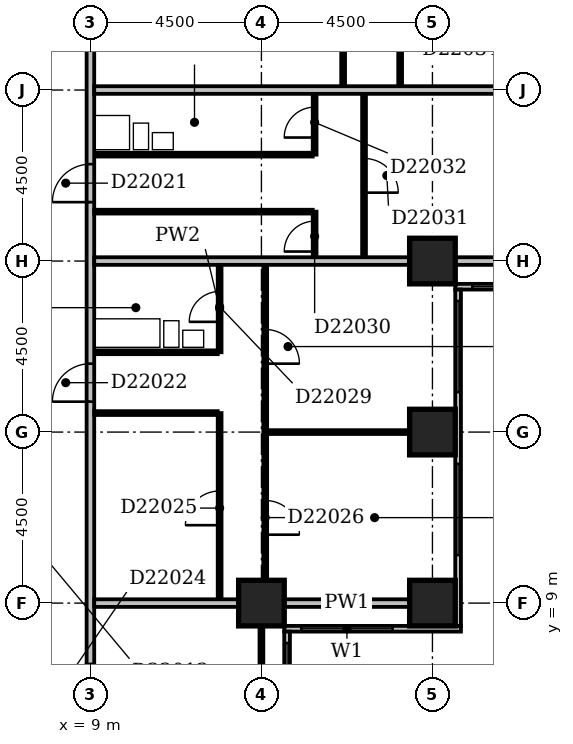
"""IFC4 building model, lengths in metres.
Left out: names, types, materials, properties, quantities, classifications, styles, units other than length and angle.
Written with IfcOpenShell. Run it as: python <this file> out.ifc"""

import sys

from ifc_helpers import new_model, si_unit, direction, frame, frame_2d, origin, origin_2d, place, context, subcontext, project, spatial, rectangle, extrude, element, fill, save


model = new_model("IFC4")
c1 = context("Model", 3, precision=1e-05, world=origin(), true_north=direction((0.0, 1.0)))
c2 = subcontext(c1, "Body", "Model", "MODEL_VIEW")
j1 = project(units=[si_unit("LENGTHUNIT", "METRE"), si_unit("PLANEANGLEUNIT", "RADIAN")], contexts=[c1])
p1 = place(None, origin())
s1 = spatial("IfcSite", under=j1, at=p1, CompositionType="ELEMENT")
p2 = place(p1, origin())
s2 = spatial("IfcBuilding", under=s1, at=p2, CompositionType="ELEMENT")
p3 = place(p2, frame((0.0, 0.0, 90.2)))
s3 = spatial("IfcBuildingStorey", under=s2, at=p3, CompositionType="ELEMENT", Elevation=90.2)
for number, where, z_axis, x_axis in (
    (1, (13.5, 9.0, -0.3), (0.0, 0.0, 1.0), (1.0, 0.0, 0.0)),
    (2, (18.0, 9.0, -0.3), (0.0, 0.0, 1.0), (1.0, 0.0, 0.0)),
    (3, (18.0, 13.5, -0.3), (0.0, 0.0, 1.0), (1.0, 0.0, 0.0)),
    (4, (18.0, 18.0, -0.3), (0.0, 0.0, 1.0), (1.0, 0.0, 0.0)),
):
    element("IfcColumn", number, at=place(p3, frame(where, z_axis=z_axis, x_axis=x_axis)), inside=s3, PredefinedType="COLUMN", context=c2, shape_type="SweptSolid", body=[
        extrude(rectangle(XDim=1.2, YDim=1.2, at=origin_2d()), origin(), (0.0, 0.0, 1.0), 3.6),
    ])
p4 = place(p3, frame((14.175, 3.9, 0.0), z_axis=(0.0, 0.0, 1.0), x_axis=(0.0, 1.0, 0.0)))
e5 = element("IfcWall", 5, at=p4, inside=s3, PredefinedType="STANDARD", context=c2, shape_type="SweptSolid", body=[
    extrude(rectangle(XDim=4.35, YDim=0.15, at=frame_2d((2.175, 0.0))), origin(), (0.0, 0.0, 1.0), 2.7),
])
p5 = place(p4, frame((1.65, 0.0, 0.6)))
e6 = element("IfcOpeningElement", 6, at=p5, cuts=e5, PredefinedType="OPENING", context=c2, shape_type="SweptSolid", body=[
    extrude(rectangle(XDim=2.4, YDim=1.8, at=frame_2d((1.2, 0.9))), frame((0.0, 0.087, 0.0), z_axis=(0.0, -1.0, 0.0), x_axis=(1.0, 0.0, 0.0)), (0.0, 0.0, 1.0), 0.174),
])
p6 = place(p3, frame((14.1, 8.325, 0.0), z_axis=(0.0, 0.0, 1.0), x_axis=(1.0, 0.0, 0.0)))
e7 = element("IfcWall", 7, at=p6, inside=s3, PredefinedType="STANDARD", context=c2, shape_type="SweptSolid", body=[
    extrude(rectangle(XDim=4.65, YDim=0.15, at=frame_2d((2.325, 0.0))), origin(), (0.0, 0.0, 1.0), 2.7),
])
p7 = place(p6, frame((0.45, 0.0, 0.6)))
e8 = element("IfcOpeningElement", 8, at=p7, cuts=e7, PredefinedType="OPENING", context=c2, shape_type="SweptSolid", body=[
    extrude(rectangle(XDim=2.4, YDim=1.8, at=frame_2d((1.2, 0.9))), frame((0.0, 0.087, 0.0), z_axis=(0.0, -1.0, 0.0), x_axis=(1.0, 0.0, 0.0)), (0.0, 0.0, 1.0), 0.174),
])
p8 = place(p3, frame((18.675, 8.4, 0.0), z_axis=(0.0, 0.0, 1.0), x_axis=(0.0, 1.0, 0.0)))
e9 = element("IfcWall", 9, at=p8, inside=s3, PredefinedType="STANDARD", context=c2, shape_type="SweptSolid", body=[
    extrude(rectangle(XDim=8.85, YDim=0.15, at=frame_2d((4.425, 0.0))), origin(), (0.0, 0.0, 1.0), 2.7),
])
p9 = place(p8, frame((1.864, 0.0, 0.6)))
e10 = element("IfcOpeningElement", 10, at=p9, cuts=e9, PredefinedType="OPENING", context=c2, shape_type="SweptSolid", body=[
    extrude(rectangle(XDim=2.4, YDim=1.8, at=frame_2d((1.2, 0.9))), frame((0.0, 0.087, 0.0), z_axis=(0.0, -1.0, 0.0), x_axis=(1.0, 0.0, 0.0)), (0.0, 0.0, 1.0), 0.174),
])
p10 = place(p8, frame((6.15, 0.0, 0.6)))
e11 = element("IfcOpeningElement", 11, at=p10, cuts=e9, PredefinedType="OPENING", context=c2, shape_type="SweptSolid", body=[
    extrude(rectangle(XDim=2.4, YDim=1.8, at=frame_2d((1.2, 0.9))), frame((0.0, 0.087, 0.0), z_axis=(0.0, -1.0, 0.0), x_axis=(1.0, 0.0, 0.0)), (0.0, 0.0, 1.0), 0.174),
])
p11 = place(p3, frame((18.6, 17.325, 0.0), z_axis=(0.0, 0.0, 1.0), x_axis=(1.0, 0.0, 0.0)))
e12 = element("IfcWall", 12, at=p11, inside=s3, PredefinedType="STANDARD", context=c2, shape_type="SweptSolid", body=[
    extrude(rectangle(XDim=4.65, YDim=0.15, at=frame_2d((2.325, 0.0))), origin(), (0.0, 0.0, 1.0), 2.7),
])
p12 = place(p11, frame((0.45, 0.0, 0.6)))
e13 = element("IfcOpeningElement", 13, at=p12, cuts=e12, PredefinedType="OPENING", context=c2, shape_type="SweptSolid", body=[
    extrude(rectangle(XDim=2.4, YDim=1.8, at=frame_2d((1.2, 0.9))), frame((0.0, 0.087, 0.0), z_axis=(0.0, -1.0, 0.0), x_axis=(1.0, 0.0, 0.0)), (0.0, 0.0, 1.0), 0.174),
])
p13 = place(p3, frame((9.0, 5.0, 0.0), z_axis=(0.0, 0.0, 1.0), x_axis=(0.0, 1.0, 0.0)))
e14 = element("IfcWall", 14, at=p13, inside=s3, PredefinedType="PARTITIONING", context=c2, shape_type="SweptSolid", body=[
    extrude(rectangle(XDim=44.5, YDim=0.2, at=frame_2d((22.25, 0.0))), origin(), (0.0, 0.0, 1.0), 3.3),
])
p14 = place(p13, frame((28.45, 0.0, 0.0)))
e15 = element("IfcOpeningElement", 15, at=p14, cuts=e14, PredefinedType="OPENING", context=c2, shape_type="SweptSolid", body=[
    extrude(rectangle(XDim=1.0, YDim=2.1, at=frame_2d((0.5, 1.05))), frame((0.0, 0.112, 0.0), z_axis=(0.0, -1.0, 0.0), x_axis=(1.0, 0.0, 0.0)), (0.0, 0.0, 1.0), 0.224),
])
p15 = place(p13, frame((22.8, 0.0, 0.0)))
e16 = element("IfcOpeningElement", 16, at=p15, cuts=e14, PredefinedType="OPENING", context=c2, shape_type="SweptSolid", body=[
    extrude(rectangle(XDim=1.0, YDim=2.1, at=frame_2d((0.5, 1.05))), frame((0.0, 0.112, 0.0), z_axis=(0.0, -1.0, 0.0), x_axis=(1.0, 0.0, 0.0)), (0.0, 0.0, 1.0), 0.224),
])
p16 = place(p13, frame((14.55, 0.0, 0.0)))
e17 = element("IfcOpeningElement", 17, at=p16, cuts=e14, PredefinedType="OPENING", context=c2, shape_type="SweptSolid", body=[
    extrude(rectangle(XDim=1.0, YDim=2.1, at=frame_2d((0.5, 1.05))), frame((0.0, 0.112, 0.0), z_axis=(0.0, -1.0, 0.0), x_axis=(1.0, 0.0, 0.0)), (0.0, 0.0, 1.0), 0.224),
])
p17 = place(p13, frame((9.3, 0.0, 0.0)))
e18 = element("IfcOpeningElement", 18, at=p17, cuts=e14, PredefinedType="OPENING", context=c2, shape_type="SweptSolid", body=[
    extrude(rectangle(XDim=1.0, YDim=2.1, at=frame_2d((0.5, 1.05))), frame((0.0, 0.112, 0.0), z_axis=(0.0, -1.0, 0.0), x_axis=(1.0, 0.0, 0.0)), (0.0, 0.0, 1.0), 0.224),
])
p18 = place(p13, frame((35.0, 0.0, 0.0)))
e19 = element("IfcOpeningElement", 19, at=p18, cuts=e14, PredefinedType="OPENING", context=c2, shape_type="SweptSolid", body=[
    extrude(rectangle(XDim=0.9, YDim=2.1, at=frame_2d((0.45, 1.05))), frame((0.0, 0.112, 0.0), z_axis=(0.0, -1.0, 0.0), x_axis=(1.0, 0.0, 0.0)), (0.0, 0.0, 1.0), 0.224),
])
p19 = place(p13, frame((1.5, 0.0, 0.0)))
e20 = element("IfcOpeningElement", 20, at=p19, cuts=e14, PredefinedType="OPENING", context=c2, shape_type="SweptSolid", body=[
    extrude(rectangle(XDim=0.9, YDim=2.1, at=frame_2d((0.45, 1.05))), frame((0.0, 0.112, 0.0), z_axis=(0.0, -1.0, 0.0), x_axis=(1.0, 0.0, 0.0)), (0.0, 0.0, 1.0), 0.224),
])
p20 = place(p3, frame((13.5, 5.1, 0.0), z_axis=(0.0, 0.0, 1.0), x_axis=(0.0, 1.0, 0.0)))
e21 = element("IfcWall", 21, at=p20, inside=s3, PredefinedType="PARTITIONING", context=c2, shape_type="SweptSolid", body=[
    extrude(rectangle(XDim=3.3, YDim=0.1, at=frame_2d((1.65, 0.0))), origin(), (0.0, 0.0, 1.0), 2.7),
])
p21 = place(p3, frame((9.1, 9.0, 0.0), z_axis=(0.0, 0.0, 1.0), x_axis=(1.0, 0.0, 0.0)))
e22 = element("IfcWall", 22, at=p21, inside=s3, PredefinedType="PARTITIONING", context=c2, shape_type="SweptSolid", body=[
    extrude(rectangle(XDim=3.8, YDim=0.2, at=frame_2d((1.9, 0.0))), origin(), (0.0, 0.0, 1.0), 3.3),
])
p22 = place(p3, frame((14.1, 9.0, 0.0), z_axis=(0.0, 0.0, 1.0), x_axis=(1.0, 0.0, 0.0)))
e23 = element("IfcWall", 23, at=p22, inside=s3, PredefinedType="PARTITIONING", context=c2, shape_type="SweptSolid", body=[
    extrude(rectangle(XDim=3.3, YDim=0.2, at=frame_2d((1.65, 0.0))), origin(), (0.0, 0.0, 1.0), 2.7),
])
p23 = place(p3, frame((12.4, 9.1, 0.0), z_axis=(0.0, 0.0, 1.0), x_axis=(0.0, 1.0, 0.0)))
e24 = element("IfcWall", 24, at=p23, inside=s3, PredefinedType="PARTITIONING", context=c2, shape_type="SweptSolid", body=[
    extrude(rectangle(XDim=4.9, YDim=0.1, at=frame_2d((2.45, 0.0))), origin(), (0.0, 0.0, 1.0), 3.3),
])
p24 = place(p23, frame((1.95, 0.0, 0.0)))
e25 = element("IfcOpeningElement", 25, at=p24, cuts=e24, PredefinedType="OPENING", context=c2, shape_type="SweptSolid", body=[
    extrude(rectangle(XDim=0.9, YDim=2.1, at=frame_2d((0.45, 1.05))), frame((0.0, 0.062, 0.0), z_axis=(0.0, -1.0, 0.0), x_axis=(1.0, 0.0, 0.0)), (0.0, 0.0, 1.0), 0.124),
])
p25 = place(p3, frame((13.6, 9.6, 0.0), z_axis=(0.0, 0.0, 1.0), x_axis=(0.0, 1.0, 0.0)))
e26 = element("IfcWall", 26, at=p25, inside=s3, PredefinedType="PARTITIONING", context=c2, shape_type="SweptSolid", body=[
    extrude(rectangle(XDim=8.3, YDim=0.1, at=frame_2d((4.15, 0.0))), origin(), (0.0, 0.0, 1.0), 3.3),
])
p26 = place(p25, frame((1.2, 0.0, 0.0)))
e27 = element("IfcOpeningElement", 27, at=p26, cuts=e26, PredefinedType="OPENING", context=c2, shape_type="SweptSolid", body=[
    extrude(rectangle(XDim=0.9, YDim=2.1, at=frame_2d((0.45, 1.05))), frame((0.0, 0.062, 0.0), z_axis=(0.0, -1.0, 0.0), x_axis=(1.0, 0.0, 0.0)), (0.0, 0.0, 1.0), 0.124),
])
p27 = place(p25, frame((5.7, 0.0, 0.0)))
e28 = element("IfcOpeningElement", 28, at=p27, cuts=e26, PredefinedType="OPENING", context=c2, shape_type="SweptSolid", body=[
    extrude(rectangle(XDim=0.9, YDim=2.1, at=frame_2d((0.45, 1.05))), frame((0.0, 0.062, 0.0), z_axis=(0.0, -1.0, 0.0), x_axis=(1.0, 0.0, 0.0)), (0.0, 0.0, 1.0), 0.124),
])
p28 = place(p3, frame((13.65, 13.5, 0.0), z_axis=(0.0, 0.0, 1.0), x_axis=(1.0, 0.0, 0.0)))
e29 = element("IfcWall", 29, at=p28, inside=s3, PredefinedType="PARTITIONING", context=c2, shape_type="SweptSolid", body=[
    extrude(rectangle(XDim=3.75, YDim=0.1, at=frame_2d((1.875, 0.0))), origin(), (0.0, 0.0, 1.0), 3.3),
])
p29 = place(p3, frame((9.1, 14.0, 0.0), z_axis=(0.0, 0.0, 1.0), x_axis=(1.0, 0.0, 0.0)))
e30 = element("IfcWall", 30, at=p29, inside=s3, PredefinedType="PARTITIONING", context=c2, shape_type="SweptSolid", body=[
    extrude(rectangle(XDim=3.25, YDim=0.1, at=frame_2d((1.625, 0.0))), origin(), (0.0, 0.0, 1.0), 3.3),
])
p30 = place(p3, frame((9.1, 15.6, 0.0), z_axis=(0.0, 0.0, 1.0), x_axis=(1.0, 0.0, 0.0)))
e31 = element("IfcWall", 31, at=p30, inside=s3, PredefinedType="PLUMBINGWALL", context=c2, shape_type="SweptSolid", body=[
    extrude(rectangle(XDim=3.25, YDim=0.1, at=frame_2d((1.625, 0.0))), origin(), (0.0, 0.0, 1.0), 3.3),
])
p31 = place(p3, frame((12.4, 15.6, 0.0), z_axis=(0.0, 0.0, 1.0), x_axis=(0.0, 1.0, 0.0)))
e32 = element("IfcWall", 32, at=p31, inside=s3, PredefinedType="PARTITIONING", context=c2, shape_type="SweptSolid", body=[
    extrude(rectangle(XDim=2.3, YDim=0.1, at=frame_2d((1.15, 0.0))), origin(), (0.0, 0.0, 1.0), 3.3),
])
p32 = place(p31, frame((0.8, 0.0, 0.0)))
e33 = element("IfcOpeningElement", 33, at=p32, cuts=e32, PredefinedType="OPENING", context=c2, shape_type="SweptSolid", body=[
    extrude(rectangle(XDim=0.8, YDim=2.1, at=frame_2d((0.4, 1.05))), frame((0.0, 0.062, 0.0), z_axis=(0.0, -1.0, 0.0), x_axis=(1.0, 0.0, 0.0)), (0.0, 0.0, 1.0), 0.124),
])
p33 = place(p3, frame((9.1, 18.0, 0.0), z_axis=(0.0, 0.0, 1.0), x_axis=(1.0, 0.0, 0.0)))
e34 = element("IfcWall", 34, at=p33, inside=s3, PredefinedType="PARTITIONING", context=c2, shape_type="SweptSolid", body=[
    extrude(rectangle(XDim=8.3, YDim=0.2, at=frame_2d((4.15, 0.0))), origin(), (0.0, 0.0, 1.0), 2.6),
])
p34 = place(p3, frame((18.6, 18.0, 0.0), z_axis=(0.0, 0.0, 1.0), x_axis=(1.0, 0.0, 0.0)))
e35 = element("IfcWall", 35, at=p34, inside=s3, PredefinedType="PARTITIONING", context=c2, shape_type="SweptSolid", body=[
    extrude(rectangle(XDim=3.3, YDim=0.2, at=frame_2d((1.65, 0.0))), origin(), (0.0, 0.0, 1.0), 2.7),
])
p35 = place(p3, frame((14.9, 18.1, 0.0), z_axis=(0.0, 0.0, 1.0), x_axis=(0.0, 1.0, 0.0)))
e36 = element("IfcWall", 36, at=p35, inside=s3, PredefinedType="PARTITIONING", context=c2, shape_type="SweptSolid", body=[
    extrude(rectangle(XDim=1.2, YDim=0.1, at=frame_2d((0.6, 0.0))), origin(), (0.0, 0.0, 1.0), 3.3),
])
p36 = place(p35, frame((0.15, 0.0, 0.0)))
e37 = element("IfcOpeningElement", 37, at=p36, cuts=e36, PredefinedType="OPENING", context=c2, shape_type="SweptSolid", body=[
    extrude(rectangle(XDim=0.8, YDim=2.1, at=frame_2d((0.4, 1.05))), frame((0.0, 0.062, 0.0), z_axis=(0.0, -1.0, 0.0), x_axis=(1.0, 0.0, 0.0)), (0.0, 0.0, 1.0), 0.124),
])
p37 = place(p3, frame((16.2, 18.1, 0.0), z_axis=(0.0, 0.0, 1.0), x_axis=(0.0, 1.0, 0.0)))
e38 = element("IfcWall", 38, at=p37, inside=s3, PredefinedType="PARTITIONING", context=c2, shape_type="SweptSolid", body=[
    extrude(rectangle(XDim=4.3, YDim=0.1, at=frame_2d((2.15, 0.0))), origin(), (0.0, 0.0, 1.0), 3.3),
])
p38 = place(p37, frame((1.7, 0.0, 0.0)))
e39 = element("IfcOpeningElement", 39, at=p38, cuts=e38, PredefinedType="OPENING", context=c2, shape_type="SweptSolid", body=[
    extrude(rectangle(XDim=0.9, YDim=2.1, at=frame_2d((0.45, 1.05))), frame((0.0, 0.062, 0.0), z_axis=(0.0, -1.0, 0.0), x_axis=(1.0, 0.0, 0.0)), (0.0, 0.0, 1.0), 0.124),
])
p39 = place(p3, frame((9.1, 19.3, 0.0), z_axis=(0.0, 0.0, 1.0), x_axis=(1.0, 0.0, 0.0)))
e40 = element("IfcWall", 40, at=p39, inside=s3, PredefinedType="PARTITIONING", context=c2, shape_type="SweptSolid", body=[
    extrude(rectangle(XDim=5.75, YDim=0.1, at=frame_2d((2.875, 0.0))), origin(), (0.0, 0.0, 1.0), 3.3),
])
p40 = place(p3, frame((9.1, 20.8, 0.0), z_axis=(0.0, 0.0, 1.0), x_axis=(1.0, 0.0, 0.0)))
e41 = element("IfcWall", 41, at=p40, inside=s3, PredefinedType="PLUMBINGWALL", context=c2, shape_type="SweptSolid", body=[
    extrude(rectangle(XDim=5.75, YDim=0.1, at=frame_2d((2.875, 0.0))), origin(), (0.0, 0.0, 1.0), 3.3),
])
p41 = place(p3, frame((14.9, 20.8, 0.0), z_axis=(0.0, 0.0, 1.0), x_axis=(0.0, 1.0, 0.0)))
e42 = element("IfcWall", 42, at=p41, inside=s3, PredefinedType="PARTITIONING", context=c2, shape_type="SweptSolid", body=[
    extrude(rectangle(XDim=1.6, YDim=0.1, at=frame_2d((0.8, 0.0))), origin(), (0.0, 0.0, 1.0), 3.3),
])
p42 = place(p41, frame((0.45, 0.0, 0.0)))
e43 = element("IfcOpeningElement", 43, at=p42, cuts=e42, PredefinedType="OPENING", context=c2, shape_type="SweptSolid", body=[
    extrude(rectangle(XDim=0.8, YDim=2.1, at=frame_2d((0.4, 1.05))), frame((0.0, 0.062, 0.0), z_axis=(0.0, -1.0, 0.0), x_axis=(1.0, 0.0, 0.0)), (0.0, 0.0, 1.0), 0.124),
])
p43 = place(p3, frame((9.1, 22.5, 0.0), z_axis=(0.0, 0.0, 1.0), x_axis=(1.0, 0.0, 0.0)))
e44 = element("IfcWall", 44, at=p43, inside=s3, PredefinedType="PARTITIONING", context=c2, shape_type="SweptSolid", body=[
    extrude(rectangle(XDim=12.8, YDim=0.2, at=frame_2d((6.4, 0.0))), origin(), (0.0, 0.0, 1.0), 3.3),
])
p44 = place(p3, frame((15.65, 22.6, 0.0), z_axis=(0.0, 0.0, 1.0), x_axis=(0.0, 1.0, 0.0)))
e45 = element("IfcWall", 45, at=p44, inside=s3, PredefinedType="PARTITIONING", context=c2, shape_type="SweptSolid", body=[
    extrude(rectangle(XDim=4.9, YDim=0.1, at=frame_2d((2.45, 0.0))), origin(), (0.0, 0.0, 1.0), 3.3),
])
p45 = place(p44, frame((1.95, 0.0, 0.0)))
e46 = element("IfcOpeningElement", 46, at=p45, cuts=e45, PredefinedType="OPENING", context=c2, shape_type="SweptSolid", body=[
    extrude(rectangle(XDim=0.9, YDim=2.1, at=frame_2d((0.45, 1.05))), frame((0.0, 0.062, 0.0), z_axis=(0.0, -1.0, 0.0), x_axis=(1.0, 0.0, 0.0)), (0.0, 0.0, 1.0), 0.124),
])
p46 = place(p3, frame((17.15, 22.6, 0.0), z_axis=(0.0, 0.0, 1.0), x_axis=(0.0, 1.0, 0.0)))
e47 = element("IfcWall", 47, at=p46, inside=s3, PredefinedType="PARTITIONING", context=c2, shape_type="SweptSolid", body=[
    extrude(rectangle(XDim=8.8, YDim=0.1, at=frame_2d((4.4, 0.0))), origin(), (0.0, 0.0, 1.0), 3.3),
])
p47 = place(p46, frame((1.7, 0.0, 0.0)))
e48 = element("IfcOpeningElement", 48, at=p47, cuts=e47, PredefinedType="OPENING", context=c2, shape_type="SweptSolid", body=[
    extrude(rectangle(XDim=0.9, YDim=2.1, at=frame_2d((0.45, 1.05))), frame((0.0, 0.062, 0.0), z_axis=(0.0, -1.0, 0.0), x_axis=(1.0, 0.0, 0.0)), (0.0, 0.0, 1.0), 0.124),
])
p48 = place(p46, frame((5.05, 0.0, 0.0)))
e49 = element("IfcOpeningElement", 49, at=p48, cuts=e47, PredefinedType="OPENING", context=c2, shape_type="SweptSolid", body=[
    extrude(rectangle(XDim=0.9, YDim=2.1, at=frame_2d((0.45, 1.05))), frame((0.0, 0.062, 0.0), z_axis=(0.0, -1.0, 0.0), x_axis=(1.0, 0.0, 0.0)), (0.0, 0.0, 1.0), 0.124),
])
p49 = place(p5, origin())
e50 = element("IfcWindow", 50, at=p49, inside=s3, PartitioningType="SINGLE_PANEL", PredefinedType="WINDOW", context=c2, shape_type="SweptSolid", body=[
    extrude(rectangle(XDim=2.4, YDim=1.8, at=frame_2d((1.2, 0.9))), frame((0.0, 0.03, 0.0), z_axis=(0.0, -1.0, 0.0), x_axis=(1.0, 0.0, 0.0)), (0.0, 0.0, 1.0), 0.06),
])
fill(e6, e50)
p50 = place(p7, origin())
e51 = element("IfcWindow", 51, at=p50, inside=s3, PartitioningType="SINGLE_PANEL", PredefinedType="WINDOW", context=c2, shape_type="SweptSolid", body=[
    extrude(rectangle(XDim=2.4, YDim=1.8, at=frame_2d((1.2, 0.9))), frame((0.0, 0.03, 0.0), z_axis=(0.0, -1.0, 0.0), x_axis=(1.0, 0.0, 0.0)), (0.0, 0.0, 1.0), 0.06),
])
fill(e8, e51)
p51 = place(p9, origin())
e52 = element("IfcWindow", 52, at=p51, inside=s3, PartitioningType="SINGLE_PANEL", PredefinedType="WINDOW", context=c2, shape_type="SweptSolid", body=[
    extrude(rectangle(XDim=2.4, YDim=1.8, at=frame_2d((1.2, 0.9))), frame((0.0, 0.03, 0.0), z_axis=(0.0, -1.0, 0.0), x_axis=(1.0, 0.0, 0.0)), (0.0, 0.0, 1.0), 0.06),
])
fill(e10, e52)
p52 = place(p10, origin())
e53 = element("IfcWindow", 53, at=p52, inside=s3, PartitioningType="SINGLE_PANEL", PredefinedType="WINDOW", context=c2, shape_type="SweptSolid", body=[
    extrude(rectangle(XDim=2.4, YDim=1.8, at=frame_2d((1.2, 0.9))), frame((0.0, 0.03, 0.0), z_axis=(0.0, -1.0, 0.0), x_axis=(1.0, 0.0, 0.0)), (0.0, 0.0, 1.0), 0.06),
])
fill(e11, e53)
p53 = place(p12, origin())
e54 = element("IfcWindow", 54, at=p53, inside=s3, PartitioningType="SINGLE_PANEL", PredefinedType="WINDOW", context=c2, shape_type="SweptSolid", body=[
    extrude(rectangle(XDim=2.4, YDim=1.8, at=frame_2d((1.2, 0.9))), frame((0.0, 0.03, 0.0), z_axis=(0.0, -1.0, 0.0), x_axis=(1.0, 0.0, 0.0)), (0.0, 0.0, 1.0), 0.06),
])
fill(e13, e54)
p54 = place(p16, origin())
e55 = element("IfcDoor", 55, at=p54, inside=s3, OperationType="SINGLE_SWING_LEFT", PredefinedType="DOOR", context=c2, shape_type="SweptSolid", body=[
    extrude(rectangle(XDim=1.0, YDim=2.1, at=frame_2d((0.5, 1.05))), frame((0.0, 0.025, 0.0), z_axis=(0.0, -1.0, 0.0), x_axis=(1.0, 0.0, 0.0)), (0.0, 0.0, 1.0), 0.05),
])
fill(e17, e55)
p55 = place(p17, origin())
e56 = element("IfcDoor", 56, at=p55, inside=s3, OperationType="SINGLE_SWING_LEFT", PredefinedType="DOOR", context=c2, shape_type="SweptSolid", body=[
    extrude(rectangle(XDim=1.0, YDim=2.1, at=frame_2d((0.5, 1.05))), frame((0.0, 0.025, 0.0), z_axis=(0.0, -1.0, 0.0), x_axis=(1.0, 0.0, 0.0)), (0.0, 0.0, 1.0), 0.05),
])
fill(e18, e56)
p56 = place(p24, origin())
e57 = element("IfcDoor", 57, at=p56, inside=s3, OperationType="SINGLE_SWING_LEFT", PredefinedType="DOOR", context=c2, shape_type="SweptSolid", body=[
    extrude(rectangle(XDim=0.9, YDim=2.1, at=frame_2d((0.45, 1.05))), frame((0.0, 0.025, 0.0), z_axis=(0.0, -1.0, 0.0), x_axis=(1.0, 0.0, 0.0)), (0.0, 0.0, 1.0), 0.05),
])
fill(e25, e57)
p57 = place(p26, frame((0.9, 0.0, 0.0), z_axis=(0.0, 0.0, 1.0), x_axis=(-1.0, 0.0, 0.0)))
e58 = element("IfcDoor", 58, at=p57, inside=s3, OperationType="SINGLE_SWING_RIGHT", PredefinedType="DOOR", context=c2, shape_type="SweptSolid", body=[
    extrude(rectangle(XDim=0.9, YDim=2.1, at=frame_2d((0.45, 1.05))), frame((0.0, 0.025, 0.0), z_axis=(0.0, -1.0, 0.0), x_axis=(1.0, 0.0, 0.0)), (0.0, 0.0, 1.0), 0.05),
])
fill(e27, e58)
p58 = place(p27, frame((0.9, 0.0, 0.0), z_axis=(0.0, 0.0, 1.0), x_axis=(-1.0, 0.0, 0.0)))
e59 = element("IfcDoor", 59, at=p58, inside=s3, OperationType="SINGLE_SWING_RIGHT", PredefinedType="DOOR", context=c2, shape_type="SweptSolid", body=[
    extrude(rectangle(XDim=0.9, YDim=2.1, at=frame_2d((0.45, 1.05))), frame((0.0, 0.025, 0.0), z_axis=(0.0, -1.0, 0.0), x_axis=(1.0, 0.0, 0.0)), (0.0, 0.0, 1.0), 0.05),
])
fill(e28, e59)
p59 = place(p32, origin())
e60 = element("IfcDoor", 60, at=p59, inside=s3, OperationType="SINGLE_SWING_LEFT", PredefinedType="DOOR", context=c2, shape_type="SweptSolid", body=[
    extrude(rectangle(XDim=0.8, YDim=2.1, at=frame_2d((0.4, 1.05))), frame((0.0, 0.025, 0.0), z_axis=(0.0, -1.0, 0.0), x_axis=(1.0, 0.0, 0.0)), (0.0, 0.0, 1.0), 0.05),
])
fill(e33, e60)
p60 = place(p36, origin())
e61 = element("IfcDoor", 61, at=p60, inside=s3, OperationType="SINGLE_SWING_LEFT", PredefinedType="DOOR", context=c2, shape_type="SweptSolid", body=[
    extrude(rectangle(XDim=0.8, YDim=2.1, at=frame_2d((0.4, 1.05))), frame((0.0, 0.025, 0.0), z_axis=(0.0, -1.0, 0.0), x_axis=(1.0, 0.0, 0.0)), (0.0, 0.0, 1.0), 0.05),
])
fill(e37, e61)
p61 = place(p38, frame((0.9, 0.0, 0.0), z_axis=(0.0, 0.0, 1.0), x_axis=(-1.0, 0.0, 0.0)))
e62 = element("IfcDoor", 62, at=p61, inside=s3, OperationType="SINGLE_SWING_RIGHT", PredefinedType="DOOR", context=c2, shape_type="SweptSolid", body=[
    extrude(rectangle(XDim=0.9, YDim=2.1, at=frame_2d((0.45, 1.05))), frame((0.0, 0.025, 0.0), z_axis=(0.0, -1.0, 0.0), x_axis=(1.0, 0.0, 0.0)), (0.0, 0.0, 1.0), 0.05),
])
fill(e39, e62)
p62 = place(p42, origin())
e63 = element("IfcDoor", 63, at=p62, inside=s3, OperationType="SINGLE_SWING_LEFT", PredefinedType="DOOR", context=c2, shape_type="SweptSolid", body=[
    extrude(rectangle(XDim=0.8, YDim=2.1, at=frame_2d((0.4, 1.05))), frame((0.0, 0.025, 0.0), z_axis=(0.0, -1.0, 0.0), x_axis=(1.0, 0.0, 0.0)), (0.0, 0.0, 1.0), 0.05),
])
fill(e43, e63)
save(model, sys.argv[1])
